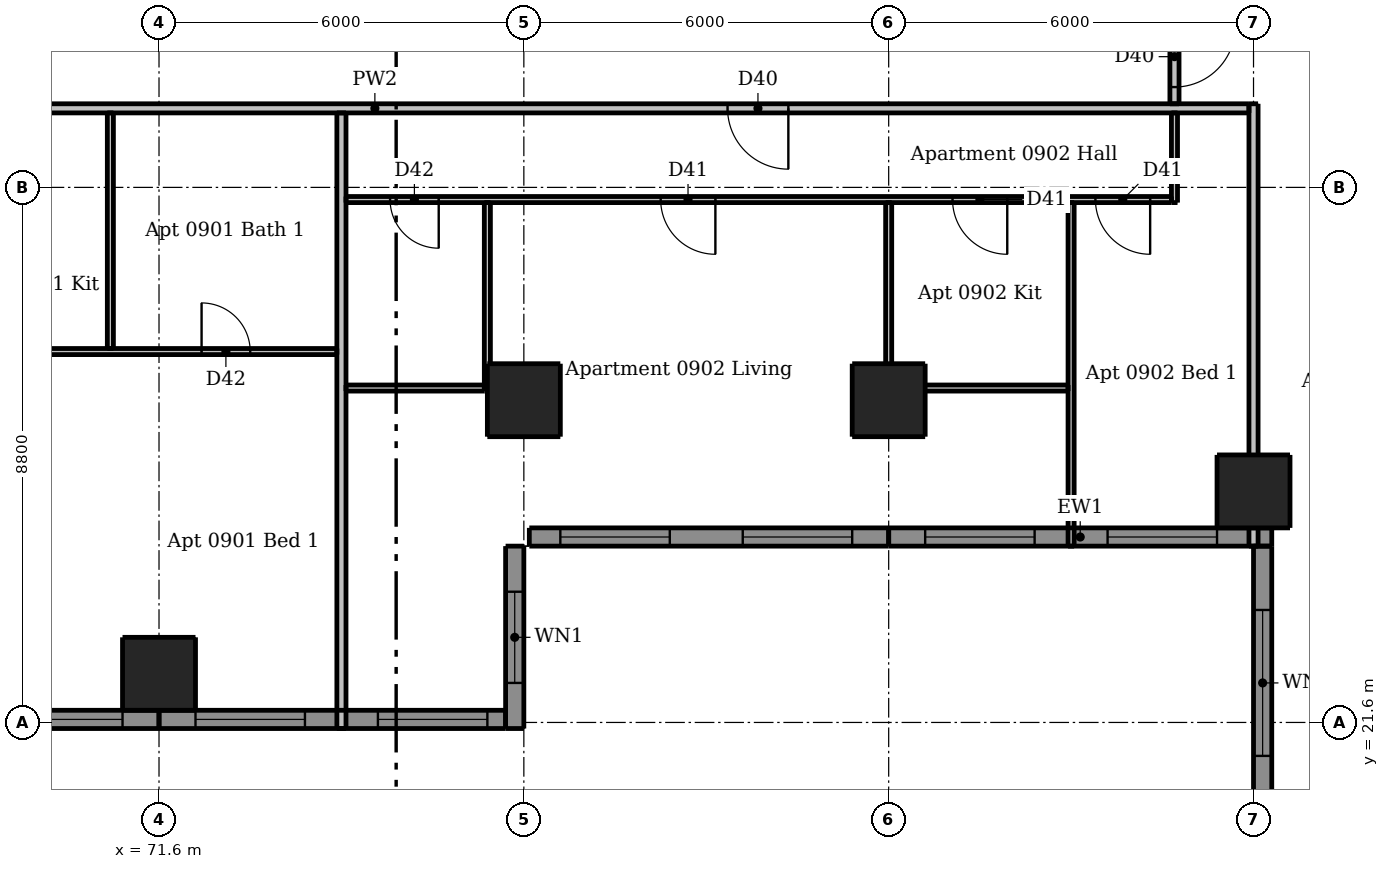
"""IFC4 building model, lengths in metres.
Left out: names, types, materials, properties, quantities, classifications, styles, units other than length and angle.
Written with IfcOpenShell. Run it as: python <this file> out.ifc"""

import sys

from ifc_helpers import new_model, si_unit, direction, frame, frame_2d, origin, origin_2d, place, context, subcontext, project, spatial, rectangle, extrude, element, fill, save


model = new_model("IFC4")
c1 = context("Model", 3, precision=1e-05, world=origin(), true_north=direction((0.0, 1.0)))
c2 = subcontext(c1, "Body", "Model", "MODEL_VIEW")
j1 = project(units=[si_unit("LENGTHUNIT", "METRE"), si_unit("PLANEANGLEUNIT", "RADIAN")], contexts=[c1])
p1 = place(None, origin())
s1 = spatial("IfcSite", under=j1, at=p1, CompositionType="ELEMENT")
p2 = place(p1, origin())
s2 = spatial("IfcBuilding", under=s1, at=p2, CompositionType="ELEMENT")
p3 = place(p2, frame((0.0, 0.0, 36.7)))
s3 = spatial("IfcBuildingStorey", under=s2, at=p3, CompositionType="ELEMENT", Elevation=36.7)
for number, where, z_axis, x_axis in (
    (1, (71.6, 22.4, 0.0), (0.0, 0.0, 1.0), (1.0, 0.0, 0.0)),
    (2, (77.6, 26.9, 0.0), (0.0, 0.0, 1.0), (1.0, 0.0, 0.0)),
    (3, (83.6, 26.9, 0.0), (0.0, 0.0, 1.0), (1.0, 0.0, 0.0)),
    (4, (89.6, 25.4, 0.0), (0.0, 0.0, 1.0), (1.0, 0.0, 0.0)),
):
    element("IfcColumn", number, at=place(p3, frame(where, z_axis=z_axis, x_axis=x_axis)), inside=s3, PredefinedType="COLUMN", context=c2, shape_type="SweptSolid", body=[
        extrude(rectangle(XDim=1.2, YDim=1.2, at=origin_2d()), origin(), (0.0, 0.0, 1.0), 3.05),
    ])
p4 = place(p3, frame((77.45, 21.5, 0.0), z_axis=(0.0, 0.0, 1.0), x_axis=(0.0, 1.0, 0.0)))
e5 = element("IfcWall", 5, at=p4, inside=s3, PredefinedType="SOLIDWALL", context=c2, shape_type="SweptSolid", body=[
    extrude(rectangle(XDim=3.0, YDim=0.3, at=frame_2d((1.5, 0.0))), origin(), (0.0, 0.0, 1.0), 3.05),
])
p5 = place(p4, frame((0.75, 0.0, 0.9)))
e6 = element("IfcOpeningElement", 6, at=p5, cuts=e5, PredefinedType="OPENING", context=c2, shape_type="SweptSolid", body=[
    extrude(rectangle(XDim=1.5, YDim=1.5, at=frame_2d((0.75, 0.75))), frame((0.0, 0.16, 0.0), z_axis=(0.0, -1.0, 0.0), x_axis=(1.0, 0.0, 0.0)), (0.0, 0.0, 1.0), 0.32),
])
p6 = place(p3, frame((89.75, 24.5, 0.0), z_axis=(0.0, 0.0, 1.0), x_axis=(0.0, -1.0, 0.0)))
e7 = element("IfcWall", 7, at=p6, inside=s3, PredefinedType="SOLIDWALL", context=c2, shape_type="SweptSolid", body=[
    extrude(rectangle(XDim=4.5, YDim=0.3, at=frame_2d((2.25, 0.0))), origin(), (0.0, 0.0, 1.0), 3.05),
])
p7 = place(p6, frame((1.05, 0.0, 0.15)))
e8 = element("IfcOpeningElement", 8, at=p7, cuts=e7, PredefinedType="OPENING", context=c2, shape_type="SweptSolid", body=[
    extrude(rectangle(XDim=2.4, YDim=2.1, at=frame_2d((1.2, 1.05))), frame((0.0, 0.16, 0.0), z_axis=(0.0, -1.0, 0.0), x_axis=(1.0, 0.0, 0.0)), (0.0, 0.0, 1.0), 0.32),
])
p8 = place(p3, frame((65.6, 21.65, 0.0), z_axis=(0.0, 0.0, 1.0), x_axis=(1.0, 0.0, 0.0)))
e9 = element("IfcWall", 9, at=p8, inside=s3, PredefinedType="SOLIDWALL", context=c2, shape_type="SweptSolid", body=[
    extrude(rectangle(XDim=6.0, YDim=0.3, at=frame_2d((3.0, 0.0))), origin(), (0.0, 0.0, 1.0), 3.05),
])
p9 = place(p8, frame((0.6, 0.0, 0.15)))
e10 = element("IfcOpeningElement", 10, at=p9, cuts=e9, PredefinedType="OPENING", context=c2, shape_type="SweptSolid", body=[
    extrude(rectangle(XDim=1.8, YDim=2.1, at=frame_2d((0.9, 1.05))), frame((0.0, 0.16, 0.0), z_axis=(0.0, -1.0, 0.0), x_axis=(1.0, 0.0, 0.0)), (0.0, 0.0, 1.0), 0.32),
])
p10 = place(p8, frame((3.6, 0.0, 0.15)))
e11 = element("IfcOpeningElement", 11, at=p10, cuts=e9, PredefinedType="OPENING", context=c2, shape_type="SweptSolid", body=[
    extrude(rectangle(XDim=1.8, YDim=2.1, at=frame_2d((0.9, 1.05))), frame((0.0, 0.16, 0.0), z_axis=(0.0, -1.0, 0.0), x_axis=(1.0, 0.0, 0.0)), (0.0, 0.0, 1.0), 0.32),
])
p11 = place(p3, frame((71.6, 21.65, 0.0), z_axis=(0.0, 0.0, 1.0), x_axis=(1.0, 0.0, 0.0)))
e12 = element("IfcWall", 12, at=p11, inside=s3, PredefinedType="SOLIDWALL", context=c2, shape_type="SweptSolid", body=[
    extrude(rectangle(XDim=5.7, YDim=0.3, at=frame_2d((2.85, 0.0))), origin(), (0.0, 0.0, 1.0), 3.05),
])
p12 = place(p11, frame((0.6, 0.0, 0.15)))
e13 = element("IfcOpeningElement", 13, at=p12, cuts=e12, PredefinedType="OPENING", context=c2, shape_type="SweptSolid", body=[
    extrude(rectangle(XDim=1.8, YDim=2.1, at=frame_2d((0.9, 1.05))), frame((0.0, 0.16, 0.0), z_axis=(0.0, -1.0, 0.0), x_axis=(1.0, 0.0, 0.0)), (0.0, 0.0, 1.0), 0.32),
])
p13 = place(p11, frame((3.6, 0.0, 0.15)))
e14 = element("IfcOpeningElement", 14, at=p13, cuts=e12, PredefinedType="OPENING", context=c2, shape_type="SweptSolid", body=[
    extrude(rectangle(XDim=1.8, YDim=2.1, at=frame_2d((0.9, 1.05))), frame((0.0, 0.16, 0.0), z_axis=(0.0, -1.0, 0.0), x_axis=(1.0, 0.0, 0.0)), (0.0, 0.0, 1.0), 0.32),
])
p14 = place(p3, frame((77.69, 24.65, 0.0), z_axis=(0.0, 0.0, 1.0), x_axis=(1.0, 0.0, 0.0)))
e15 = element("IfcWall", 15, at=p14, inside=s3, PredefinedType="SOLIDWALL", context=c2, shape_type="SweptSolid", body=[
    extrude(rectangle(XDim=5.91, YDim=0.3, at=frame_2d((2.955, 0.0))), origin(), (0.0, 0.0, 1.0), 3.05),
])
p15 = place(p14, frame((0.51, 0.0, 0.15)))
e16 = element("IfcOpeningElement", 16, at=p15, cuts=e15, PredefinedType="OPENING", context=c2, shape_type="SweptSolid", body=[
    extrude(rectangle(XDim=1.8, YDim=2.1, at=frame_2d((0.9, 1.05))), frame((0.0, 0.16, 0.0), z_axis=(0.0, -1.0, 0.0), x_axis=(1.0, 0.0, 0.0)), (0.0, 0.0, 1.0), 0.32),
])
p16 = place(p14, frame((3.51, 0.0, 0.15)))
e17 = element("IfcOpeningElement", 17, at=p16, cuts=e15, PredefinedType="OPENING", context=c2, shape_type="SweptSolid", body=[
    extrude(rectangle(XDim=1.8, YDim=2.1, at=frame_2d((0.9, 1.05))), frame((0.0, 0.16, 0.0), z_axis=(0.0, -1.0, 0.0), x_axis=(1.0, 0.0, 0.0)), (0.0, 0.0, 1.0), 0.32),
])
p17 = place(p3, frame((83.6, 24.65, 0.0), z_axis=(0.0, 0.0, 1.0), x_axis=(1.0, 0.0, 0.0)))
e18 = element("IfcWall", 18, at=p17, inside=s3, PredefinedType="SOLIDWALL", context=c2, shape_type="SweptSolid", body=[
    extrude(rectangle(XDim=6.3, YDim=0.3, at=frame_2d((3.15, 0.0))), origin(), (0.0, 0.0, 1.0), 3.05),
])
p18 = place(p17, frame((0.6, 0.0, 0.15)))
e19 = element("IfcOpeningElement", 19, at=p18, cuts=e18, PredefinedType="OPENING", context=c2, shape_type="SweptSolid", body=[
    extrude(rectangle(XDim=1.8, YDim=2.1, at=frame_2d((0.9, 1.05))), frame((0.0, 0.16, 0.0), z_axis=(0.0, -1.0, 0.0), x_axis=(1.0, 0.0, 0.0)), (0.0, 0.0, 1.0), 0.32),
])
p19 = place(p17, frame((3.6, 0.0, 0.15)))
e20 = element("IfcOpeningElement", 20, at=p19, cuts=e18, PredefinedType="OPENING", context=c2, shape_type="SweptSolid", body=[
    extrude(rectangle(XDim=1.8, YDim=2.1, at=frame_2d((0.9, 1.05))), frame((0.0, 0.16, 0.0), z_axis=(0.0, -1.0, 0.0), x_axis=(1.0, 0.0, 0.0)), (0.0, 0.0, 1.0), 0.32),
])
p20 = place(p3, frame((70.8, 27.75, 0.0), z_axis=(0.0, 0.0, 1.0), x_axis=(0.0, 1.0, 0.0)))
e21 = element("IfcWall", 21, at=p20, inside=s3, PredefinedType="PARTITIONING", context=c2, shape_type="SweptSolid", body=[
    extrude(rectangle(XDim=3.875, YDim=0.1, at=frame_2d((1.938, 0.0))), origin(), (0.0, 0.0, 1.0), 3.05),
])
p21 = place(p3, frame((77.0, 27.05, 0.0), z_axis=(0.0, 0.0, 1.0), x_axis=(0.0, 1.0, 0.0)))
e22 = element("IfcWall", 22, at=p21, inside=s3, PredefinedType="PARTITIONING", context=c2, shape_type="SweptSolid", body=[
    extrude(rectangle(XDim=3.1, YDim=0.1, at=frame_2d((1.55, 0.0))), origin(), (0.0, 0.0, 1.0), 3.05),
])
p22 = place(p3, frame((83.6, 27.05, 0.0), z_axis=(0.0, 0.0, 1.0), x_axis=(0.0, 1.0, 0.0)))
e23 = element("IfcWall", 23, at=p22, inside=s3, PredefinedType="PARTITIONING", context=c2, shape_type="SweptSolid", body=[
    extrude(rectangle(XDim=3.1, YDim=0.1, at=frame_2d((1.55, 0.0))), origin(), (0.0, 0.0, 1.0), 2.647),
])
p23 = place(p3, frame((86.6, 24.5, 0.0), z_axis=(0.0, 0.0, 1.0), x_axis=(0.0, 1.0, 0.0)))
e24 = element("IfcWall", 24, at=p23, inside=s3, PredefinedType="PARTITIONING", context=c2, shape_type="SweptSolid", body=[
    extrude(rectangle(XDim=5.65, YDim=0.1, at=frame_2d((2.825, 0.0))), origin(), (0.0, 0.0, 1.0), 3.05),
])
p24 = place(p3, frame((88.3, 30.15, 0.0), z_axis=(0.0, 0.0, 1.0), x_axis=(0.0, 1.0, 0.0)))
e25 = element("IfcWall", 25, at=p24, inside=s3, PredefinedType="PARTITIONING", context=c2, shape_type="SweptSolid", body=[
    extrude(rectangle(XDim=1.475, YDim=0.1, at=frame_2d((0.738, 0.0))), origin(), (0.0, 0.0, 1.0), 3.05),
])
p25 = place(p3, frame((88.25, 30.2, 0.0), z_axis=(0.0, 0.0, 1.0), x_axis=(-1.0, 0.0, 0.0)))
e26 = element("IfcWall", 26, at=p25, inside=s3, PredefinedType="PARTITIONING", context=c2, shape_type="SweptSolid", body=[
    extrude(rectangle(XDim=13.575, YDim=0.1, at=frame_2d((6.788, 0.0))), origin(), (0.0, 0.0, 1.0), 3.05),
])
p26 = place(p25, frame((7.5, 0.0, 0.0)))
e27 = element("IfcOpeningElement", 27, at=p26, cuts=e26, PredefinedType="OPENING", context=c2, shape_type="SweptSolid", body=[
    extrude(rectangle(XDim=0.9, YDim=2.1, at=frame_2d((0.45, 1.05))), frame((0.0, 0.06, 0.0), z_axis=(0.0, -1.0, 0.0), x_axis=(1.0, 0.0, 0.0)), (0.0, 0.0, 1.0), 0.12),
])
p27 = place(p25, frame((2.7, 0.0, 0.0)))
e28 = element("IfcOpeningElement", 28, at=p27, cuts=e26, PredefinedType="OPENING", context=c2, shape_type="SweptSolid", body=[
    extrude(rectangle(XDim=0.9, YDim=2.1, at=frame_2d((0.45, 1.05))), frame((0.0, 0.06, 0.0), z_axis=(0.0, -1.0, 0.0), x_axis=(1.0, 0.0, 0.0)), (0.0, 0.0, 1.0), 0.12),
])
p28 = place(p25, frame((0.35, 0.0, 0.0)))
e29 = element("IfcOpeningElement", 29, at=p28, cuts=e26, PredefinedType="OPENING", context=c2, shape_type="SweptSolid", body=[
    extrude(rectangle(XDim=0.9, YDim=2.1, at=frame_2d((0.45, 1.05))), frame((0.0, 0.06, 0.0), z_axis=(0.0, -1.0, 0.0), x_axis=(1.0, 0.0, 0.0)), (0.0, 0.0, 1.0), 0.12),
])
p29 = place(p25, frame((12.05, 0.0, 0.0)))
e30 = element("IfcOpeningElement", 30, at=p29, cuts=e26, PredefinedType="OPENING", context=c2, shape_type="SweptSolid", body=[
    extrude(rectangle(XDim=0.8, YDim=2.1, at=frame_2d((0.4, 1.05))), frame((0.0, 0.06, 0.0), z_axis=(0.0, -1.0, 0.0), x_axis=(1.0, 0.0, 0.0)), (0.0, 0.0, 1.0), 0.12),
])
p30 = place(p3, frame((68.45, 27.7, 0.0), z_axis=(0.0, 0.0, 1.0), x_axis=(1.0, 0.0, 0.0)))
e31 = element("IfcWall", 31, at=p30, inside=s3, PredefinedType="PARTITIONING", context=c2, shape_type="SweptSolid", body=[
    extrude(rectangle(XDim=6.075, YDim=0.1, at=frame_2d((3.038, 0.0))), origin(), (0.0, 0.0, 1.0), 3.05),
])
p31 = place(p30, frame((3.85, 0.0, 0.0)))
e32 = element("IfcOpeningElement", 32, at=p31, cuts=e31, PredefinedType="OPENING", context=c2, shape_type="SweptSolid", body=[
    extrude(rectangle(XDim=0.8, YDim=2.1, at=frame_2d((0.4, 1.05))), frame((0.0, 0.06, 0.0), z_axis=(0.0, -1.0, 0.0), x_axis=(1.0, 0.0, 0.0)), (0.0, 0.0, 1.0), 0.12),
])
p32 = place(p3, frame((74.675, 27.1, 0.0), z_axis=(0.0, 0.0, 1.0), x_axis=(1.0, 0.0, 0.0)))
e33 = element("IfcWall", 33, at=p32, inside=s3, PredefinedType="PARTITIONING", context=c2, shape_type="SweptSolid", body=[
    extrude(rectangle(XDim=2.275, YDim=0.1, at=frame_2d((1.137, 0.0))), origin(), (0.0, 0.0, 1.0), 3.05),
])
p33 = place(p3, frame((83.65, 27.1, 0.0), z_axis=(0.0, 0.0, 1.0), x_axis=(1.0, 0.0, 0.0)))
e34 = element("IfcWall", 34, at=p33, inside=s3, PredefinedType="PARTITIONING", context=c2, shape_type="SweptSolid", body=[
    extrude(rectangle(XDim=2.9, YDim=0.1, at=frame_2d((1.45, 0.0))), origin(), (0.0, 0.0, 1.0), 3.05),
])
p34 = place(p3, frame((74.6, 21.5, 0.0), z_axis=(0.0, 0.0, 1.0), x_axis=(0.0, 1.0, 0.0)))
e35 = element("IfcWall", 35, at=p34, inside=s3, PredefinedType="PARTITIONING", context=c2, shape_type="SweptSolid", body=[
    extrude(rectangle(XDim=10.125, YDim=0.15, at=frame_2d((5.062, 0.0))), origin(), (0.0, 0.0, 1.0), 3.05),
])
p35 = place(p3, frame((88.3, 60.475, 0.0), z_axis=(0.0, 0.0, 1.0), x_axis=(0.0, -1.0, 0.0)))
e36 = element("IfcWall", 36, at=p35, inside=s3, PredefinedType="PARTITIONING", context=c2, shape_type="SweptSolid", body=[
    extrude(rectangle(XDim=28.7, YDim=0.15, at=frame_2d((14.35, 0.0))), origin(), (0.0, 0.0, 1.0), 3.05),
])
p36 = place(p35, frame((27.425, 0.0, 0.0)))
e37 = element("IfcOpeningElement", 37, at=p36, cuts=e36, PredefinedType="OPENING", context=c2, shape_type="SweptSolid", body=[
    extrude(rectangle(XDim=1.0, YDim=2.1, at=frame_2d((0.5, 1.05))), frame((0.0, 0.085, 0.0), z_axis=(0.0, -1.0, 0.0), x_axis=(1.0, 0.0, 0.0)), (0.0, 0.0, 1.0), 0.17),
])
p37 = place(p35, frame((10.625, 0.0, 0.0)))
e38 = element("IfcOpeningElement", 38, at=p37, cuts=e36, PredefinedType="OPENING", context=c2, shape_type="SweptSolid", body=[
    extrude(rectangle(XDim=1.0, YDim=2.1, at=frame_2d((0.5, 1.05))), frame((0.0, 0.085, 0.0), z_axis=(0.0, -1.0, 0.0), x_axis=(1.0, 0.0, 0.0)), (0.0, 0.0, 1.0), 0.17),
])
p38 = place(p3, frame((89.6, 24.5, 0.0), z_axis=(0.0, 0.0, 1.0), x_axis=(0.0, 1.0, 0.0)))
e39 = element("IfcWall", 39, at=p38, inside=s3, PredefinedType="PARTITIONING", context=c2, shape_type="SweptSolid", body=[
    extrude(rectangle(XDim=7.275, YDim=0.15, at=frame_2d((3.637, 0.0))), origin(), (0.0, 0.0, 1.0), 2.516),
])
p39 = place(p3, frame((89.525, 31.7, 0.0), z_axis=(0.0, 0.0, 1.0), x_axis=(-1.0, 0.0, 0.0)))
e40 = element("IfcWall", 40, at=p39, inside=s3, PredefinedType="PARTITIONING", context=c2, shape_type="SweptSolid", body=[
    extrude(rectangle(XDim=28.75, YDim=0.15, at=frame_2d((14.375, 0.0))), origin(), (0.0, 0.0, 1.0), 3.05),
])
p40 = place(p39, frame((24.475, 0.0, 0.0)))
e41 = element("IfcOpeningElement", 41, at=p40, cuts=e40, PredefinedType="OPENING", context=c2, shape_type="SweptSolid", body=[
    extrude(rectangle(XDim=1.0, YDim=2.1, at=frame_2d((0.5, 1.05))), frame((0.0, 0.085, 0.0), z_axis=(0.0, -1.0, 0.0), x_axis=(1.0, 0.0, 0.0)), (0.0, 0.0, 1.0), 0.17),
])
p41 = place(p39, frame((7.575, 0.0, 0.0)))
e42 = element("IfcOpeningElement", 42, at=p41, cuts=e40, PredefinedType="OPENING", context=c2, shape_type="SweptSolid", body=[
    extrude(rectangle(XDim=1.0, YDim=2.1, at=frame_2d((0.5, 1.05))), frame((0.0, 0.085, 0.0), z_axis=(0.0, -1.0, 0.0), x_axis=(1.0, 0.0, 0.0)), (0.0, 0.0, 1.0), 0.17),
])
p42 = place(p5, origin())
e43 = element("IfcWindow", 43, at=p42, inside=s3, PartitioningType="DOUBLE_PANEL_VERTICAL", PredefinedType="WINDOW", context=c2, shape_type="SweptSolid", body=[
    extrude(rectangle(XDim=1.5, YDim=1.5, at=frame_2d((0.75, 0.75))), frame((0.0, 0.03, 0.0), z_axis=(0.0, -1.0, 0.0), x_axis=(1.0, 0.0, 0.0)), (0.0, 0.0, 1.0), 0.06),
])
fill(e6, e43)
p43 = place(p7, origin())
e44 = element("IfcWindow", 44, at=p43, inside=s3, PartitioningType="DOUBLE_PANEL_VERTICAL", PredefinedType="WINDOW", context=c2, shape_type="SweptSolid", body=[
    extrude(rectangle(XDim=2.4, YDim=2.1, at=frame_2d((1.2, 1.05))), frame((0.0, 0.03, 0.0), z_axis=(0.0, -1.0, 0.0), x_axis=(1.0, 0.0, 0.0)), (0.0, 0.0, 1.0), 0.06),
])
fill(e8, e44)
p44 = place(p10, origin())
e45 = element("IfcWindow", 45, at=p44, inside=s3, PartitioningType="DOUBLE_PANEL_VERTICAL", PredefinedType="WINDOW", context=c2, shape_type="SweptSolid", body=[
    extrude(rectangle(XDim=1.8, YDim=2.1, at=frame_2d((0.9, 1.05))), frame((0.0, 0.03, 0.0), z_axis=(0.0, -1.0, 0.0), x_axis=(1.0, 0.0, 0.0)), (0.0, 0.0, 1.0), 0.06),
])
fill(e11, e45)
p45 = place(p12, origin())
e46 = element("IfcWindow", 46, at=p45, inside=s3, PartitioningType="DOUBLE_PANEL_VERTICAL", PredefinedType="WINDOW", context=c2, shape_type="SweptSolid", body=[
    extrude(rectangle(XDim=1.8, YDim=2.1, at=frame_2d((0.9, 1.05))), frame((0.0, 0.03, 0.0), z_axis=(0.0, -1.0, 0.0), x_axis=(1.0, 0.0, 0.0)), (0.0, 0.0, 1.0), 0.06),
])
fill(e13, e46)
p46 = place(p13, origin())
e47 = element("IfcWindow", 47, at=p46, inside=s3, PartitioningType="DOUBLE_PANEL_VERTICAL", PredefinedType="WINDOW", context=c2, shape_type="SweptSolid", body=[
    extrude(rectangle(XDim=1.8, YDim=2.1, at=frame_2d((0.9, 1.05))), frame((0.0, 0.03, 0.0), z_axis=(0.0, -1.0, 0.0), x_axis=(1.0, 0.0, 0.0)), (0.0, 0.0, 1.0), 0.06),
])
fill(e14, e47)
p47 = place(p15, origin())
e48 = element("IfcWindow", 48, at=p47, inside=s3, PartitioningType="DOUBLE_PANEL_VERTICAL", PredefinedType="WINDOW", context=c2, shape_type="SweptSolid", body=[
    extrude(rectangle(XDim=1.8, YDim=2.1, at=frame_2d((0.9, 1.05))), frame((0.0, 0.03, 0.0), z_axis=(0.0, -1.0, 0.0), x_axis=(1.0, 0.0, 0.0)), (0.0, 0.0, 1.0), 0.06),
])
fill(e16, e48)
p48 = place(p16, origin())
e49 = element("IfcWindow", 49, at=p48, inside=s3, PartitioningType="DOUBLE_PANEL_VERTICAL", PredefinedType="WINDOW", context=c2, shape_type="SweptSolid", body=[
    extrude(rectangle(XDim=1.8, YDim=2.1, at=frame_2d((0.9, 1.05))), frame((0.0, 0.03, 0.0), z_axis=(0.0, -1.0, 0.0), x_axis=(1.0, 0.0, 0.0)), (0.0, 0.0, 1.0), 0.06),
])
fill(e17, e49)
p49 = place(p18, origin())
e50 = element("IfcWindow", 50, at=p49, inside=s3, PartitioningType="DOUBLE_PANEL_VERTICAL", PredefinedType="WINDOW", context=c2, shape_type="SweptSolid", body=[
    extrude(rectangle(XDim=1.8, YDim=2.1, at=frame_2d((0.9, 1.05))), frame((0.0, 0.03, 0.0), z_axis=(0.0, -1.0, 0.0), x_axis=(1.0, 0.0, 0.0)), (0.0, 0.0, 1.0), 0.06),
])
fill(e19, e50)
p50 = place(p19, origin())
e51 = element("IfcWindow", 51, at=p50, inside=s3, PartitioningType="DOUBLE_PANEL_VERTICAL", PredefinedType="WINDOW", context=c2, shape_type="SweptSolid", body=[
    extrude(rectangle(XDim=1.8, YDim=2.1, at=frame_2d((0.9, 1.05))), frame((0.0, 0.03, 0.0), z_axis=(0.0, -1.0, 0.0), x_axis=(1.0, 0.0, 0.0)), (0.0, 0.0, 1.0), 0.06),
])
fill(e20, e51)
p51 = place(p31, origin())
e52 = element("IfcDoor", 52, at=p51, inside=s3, OperationType="SINGLE_SWING_LEFT", PredefinedType="DOOR", context=c2, shape_type="SweptSolid", body=[
    extrude(rectangle(XDim=0.8, YDim=2.1, at=frame_2d((0.4, 1.05))), frame((0.0, 0.025, 0.0), z_axis=(0.0, -1.0, 0.0), x_axis=(1.0, 0.0, 0.0)), (0.0, 0.0, 1.0), 0.05),
])
fill(e32, e52)
p52 = place(p41, origin())
e53 = element("IfcDoor", 53, at=p52, inside=s3, OperationType="SINGLE_SWING_LEFT", PredefinedType="DOOR", context=c2, shape_type="SweptSolid", body=[
    extrude(rectangle(XDim=1.0, YDim=2.1, at=frame_2d((0.5, 1.05))), frame((0.0, 0.025, 0.0), z_axis=(0.0, -1.0, 0.0), x_axis=(1.0, 0.0, 0.0)), (0.0, 0.0, 1.0), 0.05),
])
fill(e42, e53)
p53 = place(p26, origin())
e54 = element("IfcDoor", 54, at=p53, inside=s3, OperationType="SINGLE_SWING_LEFT", PredefinedType="DOOR", context=c2, shape_type="SweptSolid", body=[
    extrude(rectangle(XDim=0.9, YDim=2.1, at=frame_2d((0.45, 1.05))), frame((0.0, 0.025, 0.0), z_axis=(0.0, -1.0, 0.0), x_axis=(1.0, 0.0, 0.0)), (0.0, 0.0, 1.0), 0.05),
])
fill(e27, e54)
p54 = place(p27, origin())
e55 = element("IfcDoor", 55, at=p54, inside=s3, OperationType="SINGLE_SWING_LEFT", PredefinedType="DOOR", context=c2, shape_type="SweptSolid", body=[
    extrude(rectangle(XDim=0.9, YDim=2.1, at=frame_2d((0.45, 1.05))), frame((0.0, 0.025, 0.0), z_axis=(0.0, -1.0, 0.0), x_axis=(1.0, 0.0, 0.0)), (0.0, 0.0, 1.0), 0.05),
])
fill(e28, e55)
p55 = place(p28, origin())
e56 = element("IfcDoor", 56, at=p55, inside=s3, OperationType="SINGLE_SWING_LEFT", PredefinedType="DOOR", context=c2, shape_type="SweptSolid", body=[
    extrude(rectangle(XDim=0.9, YDim=2.1, at=frame_2d((0.45, 1.05))), frame((0.0, 0.025, 0.0), z_axis=(0.0, -1.0, 0.0), x_axis=(1.0, 0.0, 0.0)), (0.0, 0.0, 1.0), 0.05),
])
fill(e29, e56)
p56 = place(p29, origin())
e57 = element("IfcDoor", 57, at=p56, inside=s3, OperationType="SINGLE_SWING_LEFT", PredefinedType="DOOR", context=c2, shape_type="SweptSolid", body=[
    extrude(rectangle(XDim=0.8, YDim=2.1, at=frame_2d((0.4, 1.05))), frame((0.0, 0.025, 0.0), z_axis=(0.0, -1.0, 0.0), x_axis=(1.0, 0.0, 0.0)), (0.0, 0.0, 1.0), 0.05),
])
fill(e30, e57)
p57 = place(p36, origin())
e58 = element("IfcDoor", 58, at=p57, inside=s3, OperationType="SINGLE_SWING_LEFT", PredefinedType="DOOR", context=c2, shape_type="SweptSolid", body=[
    extrude(rectangle(XDim=1.0, YDim=2.1, at=frame_2d((0.5, 1.05))), frame((0.0, 0.025, 0.0), z_axis=(0.0, -1.0, 0.0), x_axis=(1.0, 0.0, 0.0)), (0.0, 0.0, 1.0), 0.05),
])
fill(e37, e58)
save(model, sys.argv[1])
